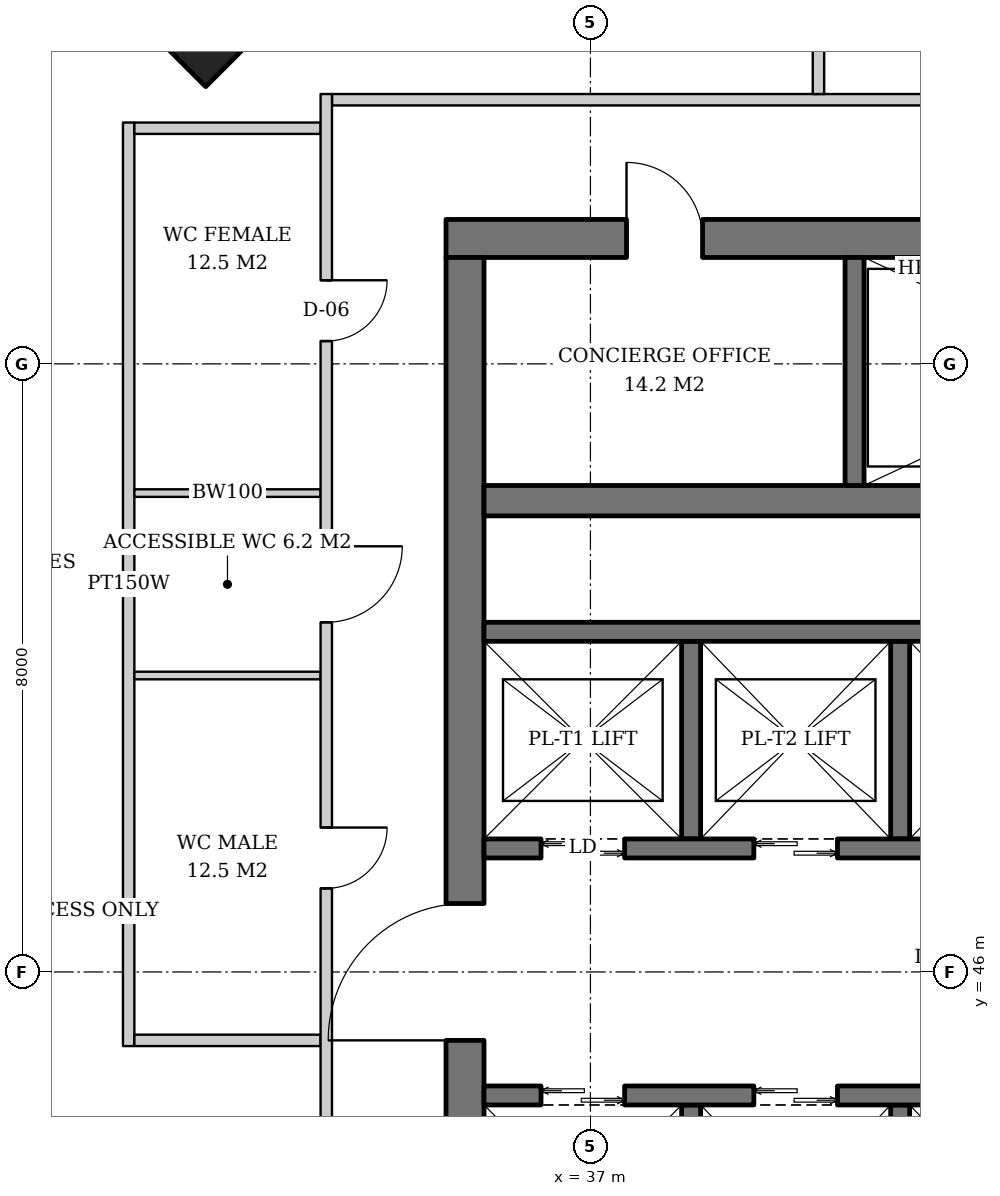
"""IFC4 building model, lengths in metres.
Left out: names, types, materials, properties, quantities, classifications, styles, units other than length and angle.
Written with IfcOpenShell. Run it as: python <this file> out.ifc"""

import sys

from ifc_helpers import new_model, si_unit, direction, frame, frame_2d, origin, origin_2d, place, context, subcontext, project, spatial, rectangle, extrude, element, fill, save


model = new_model("IFC4")
c1 = context("Model", 3, precision=1e-05, world=origin(), true_north=direction((0.0, 1.0)))
c2 = subcontext(c1, "Body", "Model", "MODEL_VIEW")
j1 = project(units=[si_unit("LENGTHUNIT", "METRE"), si_unit("PLANEANGLEUNIT", "RADIAN")], contexts=[c1])
p1 = place(None, origin())
s1 = spatial("IfcSite", under=j1, at=p1, CompositionType="ELEMENT")
p2 = place(p1, origin())
s2 = spatial("IfcBuilding", under=s1, at=p2, CompositionType="ELEMENT")
p3 = place(p2, frame((0.0, 0.0, 233.8)))
s3 = spatial("IfcBuildingStorey", under=s2, at=p3, CompositionType="ELEMENT", Elevation=233.8)
p4 = place(p3, frame((31.9, 59.1, 0.0), z_axis=(0.031962158256, -0.031962158256, 0.998977898093), x_axis=(0.707106781187, 0.707106781187, 0.0)))
e1 = element("IfcColumn", 1, at=p4, inside=s3, PredefinedType="COLUMN", context=c2, shape_type="SweptSolid", body=[
    extrude(rectangle(XDim=2.0, YDim=2.0, at=origin_2d()), origin(), (0.0, 0.0, 1.0), 3.804),
])
p5 = place(p3, frame((35.1, 55.65, 0.0), z_axis=(0.0, 0.0, 1.0), x_axis=(1.0, 0.0, 0.0)))
e2 = element("IfcWall", 2, at=p5, inside=s3, PredefinedType="SHEAR", context=c2, shape_type="SweptSolid", body=[
    extrude(rectangle(XDim=19.8, YDim=0.5, at=frame_2d((9.9, 0.0))), origin(), (0.0, 0.0, 1.0), 3.8),
])
p6 = place(p5, frame((14.54, 0.0, 0.0)))
e3 = element("IfcOpeningElement", 3, at=p6, cuts=e2, PredefinedType="OPENING", context=c2, shape_type="SweptSolid", body=[
    extrude(rectangle(XDim=1.0, YDim=2.1, at=frame_2d((0.5, 1.05))), frame((0.0, 0.26, 0.0), z_axis=(0.0, -1.0, 0.0), x_axis=(1.0, 0.0, 0.0)), (0.0, 0.0, 1.0), 0.52),
])
p7 = place(p5, frame((2.375, 0.0, 0.0)))
e4 = element("IfcOpeningElement", 4, at=p7, cuts=e2, PredefinedType="OPENING", context=c2, shape_type="SweptSolid", body=[
    extrude(rectangle(XDim=1.0, YDim=2.1, at=frame_2d((0.5, 1.05))), frame((0.0, 0.26, 0.0), z_axis=(0.0, -1.0, 0.0), x_axis=(1.0, 0.0, 0.0)), (0.0, 0.0, 1.0), 0.52),
])
p8 = place(p3, frame((35.35, 36.6, 0.0), z_axis=(0.0, 0.0, 1.0), x_axis=(0.0, 1.0, 0.0)))
e5 = element("IfcWall", 5, at=p8, inside=s3, PredefinedType="SHEAR", context=c2, shape_type="SweptSolid", body=[
    extrude(rectangle(XDim=18.8, YDim=0.5, at=frame_2d((9.4, 0.0))), origin(), (0.0, 0.0, 1.0), 3.8),
])
p9 = place(p8, frame((8.5, 0.0, 0.0)))
e6 = element("IfcOpeningElement", 6, at=p9, cuts=e5, PredefinedType="OPENING", context=c2, shape_type="SweptSolid", body=[
    extrude(rectangle(XDim=1.8, YDim=2.4, at=frame_2d((0.9, 1.2))), frame((0.0, 0.26, 0.0), z_axis=(0.0, -1.0, 0.0), x_axis=(1.0, 0.0, 0.0)), (0.0, 0.0, 1.0), 0.52),
])
p10 = place(p3, frame((35.6, 52.2, 0.0), z_axis=(0.0, 0.0, 1.0), x_axis=(1.0, 0.0, 0.0)))
e7 = element("IfcWall", 7, at=p10, inside=s3, PredefinedType="SHEAR", context=c2, shape_type="SweptSolid", body=[
    extrude(rectangle(XDim=18.8, YDim=0.4, at=frame_2d((9.4, 0.0))), origin(), (0.0, 0.0, 1.0), 3.8),
])
p11 = place(p3, frame((40.475, 52.4, 0.0), z_axis=(0.0, 0.0, 1.0), x_axis=(0.0, 1.0, 0.0)))
e8 = element("IfcWall", 8, at=p11, inside=s3, PredefinedType="SHEAR", context=c2, shape_type="SweptSolid", body=[
    extrude(rectangle(XDim=3.0, YDim=0.25, at=frame_2d((1.5, 0.0))), origin(), (0.0, 0.0, 1.0), 3.8),
])
for number, where, z_axis, x_axis in (
    (9, (38.325, 47.75, 0.0), (0.0, 0.0, 1.0), (0.0, 1.0, 0.0)),
    (10, (41.075, 47.75, 0.0), (0.0, 0.0, 1.0), (0.0, 1.0, 0.0)),
):
    element("IfcWall", number, at=place(p3, frame(where, z_axis=z_axis, x_axis=x_axis)), inside=s3, PredefinedType="SHEAR", context=c2, shape_type="SweptSolid", body=[
        extrude(rectangle(XDim=2.6, YDim=0.25, at=frame_2d((1.3, 0.0))), origin(), (0.0, 0.0, 1.0), 3.8),
    ])
p12 = place(p3, frame((35.6, 50.475, 0.0), z_axis=(0.0, 0.0, 1.0), x_axis=(1.0, 0.0, 0.0)))
e11 = element("IfcWall", 11, at=p12, inside=s3, PredefinedType="SHEAR", context=c2, shape_type="SweptSolid", body=[
    extrude(rectangle(XDim=11.1, YDim=0.25, at=frame_2d((5.55, 0.0))), origin(), (0.0, 0.0, 1.0), 3.8),
])
p13 = place(p3, frame((35.6, 47.625, 0.0), z_axis=(0.0, 0.0, 1.0), x_axis=(1.0, 0.0, 0.0)))
e12 = element("IfcWall", 12, at=p13, inside=s3, PredefinedType="SHEAR", context=c2, shape_type="SweptSolid", body=[
    extrude(rectangle(XDim=12.93, YDim=0.25, at=frame_2d((6.465, 0.0))), origin(), (0.0, 0.0, 1.0), 3.8),
])
p14 = place(p13, frame((0.75, 0.0, 0.0)))
e13 = element("IfcOpeningElement", 13, at=p14, cuts=e12, PredefinedType="OPENING", context=c2, shape_type="SweptSolid", body=[
    extrude(rectangle(XDim=1.1, YDim=2.2, at=frame_2d((0.55, 1.1))), frame((0.0, 0.135, 0.0), z_axis=(0.0, -1.0, 0.0), x_axis=(1.0, 0.0, 0.0)), (0.0, 0.0, 1.0), 0.27),
])
p15 = place(p13, frame((3.55, 0.0, 0.0)))
e14 = element("IfcOpeningElement", 14, at=p15, cuts=e12, PredefinedType="OPENING", context=c2, shape_type="SweptSolid", body=[
    extrude(rectangle(XDim=1.1, YDim=2.2, at=frame_2d((0.55, 1.1))), frame((0.0, 0.135, 0.0), z_axis=(0.0, -1.0, 0.0), x_axis=(1.0, 0.0, 0.0)), (0.0, 0.0, 1.0), 0.27),
])
p16 = place(p13, frame((6.3, 0.0, 0.0)))
e15 = element("IfcOpeningElement", 15, at=p16, cuts=e12, PredefinedType="OPENING", context=c2, shape_type="SweptSolid", body=[
    extrude(rectangle(XDim=1.1, YDim=2.2, at=frame_2d((0.55, 1.1))), frame((0.0, 0.135, 0.0), z_axis=(0.0, -1.0, 0.0), x_axis=(1.0, 0.0, 0.0)), (0.0, 0.0, 1.0), 0.27),
])
p17 = place(p13, frame((9.1, 0.0, 0.0)))
e16 = element("IfcOpeningElement", 16, at=p17, cuts=e12, PredefinedType="OPENING", context=c2, shape_type="SweptSolid", body=[
    extrude(rectangle(XDim=1.0, YDim=2.1, at=frame_2d((0.5, 1.05))), frame((0.0, 0.135, 0.0), z_axis=(0.0, -1.0, 0.0), x_axis=(1.0, 0.0, 0.0)), (0.0, 0.0, 1.0), 0.27),
])
p18 = place(p13, frame((11.615, 0.0, 0.0)))
e17 = element("IfcOpeningElement", 17, at=p18, cuts=e12, PredefinedType="OPENING", context=c2, shape_type="SweptSolid", body=[
    extrude(rectangle(XDim=0.8, YDim=2.0, at=frame_2d((0.4, 1.0))), frame((0.0, 0.135, 0.0), z_axis=(0.0, -1.0, 0.0), x_axis=(1.0, 0.0, 0.0)), (0.0, 0.0, 1.0), 0.27),
])
for number, where, z_axis, x_axis in (
    (18, (38.325, 44.25, 0.0), (0.0, 0.0, 1.0), (0.0, -1.0, 0.0)),
    (19, (41.075, 44.25, 0.0), (0.0, 0.0, 1.0), (0.0, -1.0, 0.0)),
):
    element("IfcWall", number, at=place(p3, frame(where, z_axis=z_axis, x_axis=x_axis)), inside=s3, PredefinedType="SHEAR", context=c2, shape_type="SweptSolid", body=[
        extrude(rectangle(XDim=2.6, YDim=0.25, at=frame_2d((1.3, 0.0))), origin(), (0.0, 0.0, 1.0), 3.8),
    ])
p19 = place(p3, frame((35.6, 44.375, 0.0), z_axis=(0.0, 0.0, 1.0), x_axis=(1.0, 0.0, 0.0)))
e20 = element("IfcWall", 20, at=p19, inside=s3, PredefinedType="SHEAR", context=c2, shape_type="SweptSolid", body=[
    extrude(rectangle(XDim=12.93, YDim=0.25, at=frame_2d((6.465, 0.0))), origin(), (0.0, 0.0, 1.0), 3.8),
])
p20 = place(p19, frame((0.75, 0.0, 0.0)))
e21 = element("IfcOpeningElement", 21, at=p20, cuts=e20, PredefinedType="OPENING", context=c2, shape_type="SweptSolid", body=[
    extrude(rectangle(XDim=1.1, YDim=2.2, at=frame_2d((0.55, 1.1))), frame((0.0, 0.135, 0.0), z_axis=(0.0, -1.0, 0.0), x_axis=(1.0, 0.0, 0.0)), (0.0, 0.0, 1.0), 0.27),
])
p21 = place(p19, frame((3.55, 0.0, 0.0)))
e22 = element("IfcOpeningElement", 22, at=p21, cuts=e20, PredefinedType="OPENING", context=c2, shape_type="SweptSolid", body=[
    extrude(rectangle(XDim=1.1, YDim=2.2, at=frame_2d((0.55, 1.1))), frame((0.0, 0.135, 0.0), z_axis=(0.0, -1.0, 0.0), x_axis=(1.0, 0.0, 0.0)), (0.0, 0.0, 1.0), 0.27),
])
p22 = place(p19, frame((6.3, 0.0, 0.0)))
e23 = element("IfcOpeningElement", 23, at=p22, cuts=e20, PredefinedType="OPENING", context=c2, shape_type="SweptSolid", body=[
    extrude(rectangle(XDim=1.1, YDim=2.2, at=frame_2d((0.55, 1.1))), frame((0.0, 0.135, 0.0), z_axis=(0.0, -1.0, 0.0), x_axis=(1.0, 0.0, 0.0)), (0.0, 0.0, 1.0), 0.27),
])
p23 = place(p19, frame((9.1, 0.0, 0.0)))
e24 = element("IfcOpeningElement", 24, at=p23, cuts=e20, PredefinedType="OPENING", context=c2, shape_type="SweptSolid", body=[
    extrude(rectangle(XDim=1.0, YDim=2.1, at=frame_2d((0.5, 1.05))), frame((0.0, 0.135, 0.0), z_axis=(0.0, -1.0, 0.0), x_axis=(1.0, 0.0, 0.0)), (0.0, 0.0, 1.0), 0.27),
])
p24 = place(p19, frame((11.615, 0.0, 0.0)))
e25 = element("IfcOpeningElement", 25, at=p24, cuts=e20, PredefinedType="OPENING", context=c2, shape_type="SweptSolid", body=[
    extrude(rectangle(XDim=0.8, YDim=2.0, at=frame_2d((0.4, 1.0))), frame((0.0, 0.135, 0.0), z_axis=(0.0, -1.0, 0.0), x_axis=(1.0, 0.0, 0.0)), (0.0, 0.0, 1.0), 0.27),
])
p25 = place(p3, frame((56.55, 57.475, 0.0), z_axis=(0.0, 0.0, 1.0), x_axis=(-1.0, 0.0, 0.0)))
e26 = element("IfcWall", 26, at=p25, inside=s3, PredefinedType="PARTITIONING", context=c2, shape_type="SweptSolid", body=[
    extrude(rectangle(XDim=22.95, YDim=0.15, at=frame_2d((11.475, 0.0))), origin(), (0.0, 0.0, 1.0), 3.02),
])
p26 = place(p25, frame((2.812, 0.0, 0.0)))
e27 = element("IfcOpeningElement", 27, at=p26, cuts=e26, PredefinedType="OPENING", context=c2, shape_type="SweptSolid", body=[
    extrude(rectangle(XDim=1.0, YDim=2.1, at=frame_2d((0.5, 1.05))), frame((0.0, 0.085, 0.0), z_axis=(0.0, -1.0, 0.0), x_axis=(1.0, 0.0, 0.0)), (0.0, 0.0, 1.0), 0.17),
])
p27 = place(p25, frame((11.05, 0.0, 0.0)))
e28 = element("IfcOpeningElement", 28, at=p27, cuts=e26, PredefinedType="OPENING", context=c2, shape_type="SweptSolid", body=[
    extrude(rectangle(XDim=1.0, YDim=2.1, at=frame_2d((0.5, 1.05))), frame((0.0, 0.085, 0.0), z_axis=(0.0, -1.0, 0.0), x_axis=(1.0, 0.0, 0.0)), (0.0, 0.0, 1.0), 0.17),
])
p28 = place(p3, frame((40.0, 57.55, 0.0), z_axis=(0.0, 0.0, 1.0), x_axis=(0.0, 1.0, 0.0)))
e29 = element("IfcWall", 29, at=p28, inside=s3, PredefinedType="PARTITIONING", context=c2, shape_type="SweptSolid", body=[
    extrude(rectangle(XDim=4.25, YDim=0.15, at=frame_2d((2.125, 0.0))), origin(), (0.0, 0.0, 1.0), 3.62),
])
p29 = place(p3, frame((30.925, 57.175, 0.0), z_axis=(0.0, 0.0, 1.0), x_axis=(0.0, -1.0, 0.0)))
e30 = element("IfcWall", 30, at=p29, inside=s3, PredefinedType="PARTITIONING", context=c2, shape_type="SweptSolid", body=[
    extrude(rectangle(XDim=12.15, YDim=0.15, at=frame_2d((6.075, 0.0))), origin(), (0.0, 0.0, 1.0), 3.02),
])
p30 = place(p3, frame((33.45, 57.1, 0.0), z_axis=(0.0, 0.0, 1.0), x_axis=(-1.0, 0.0, 0.0)))
e31 = element("IfcWall", 31, at=p30, inside=s3, PredefinedType="PARTITIONING", context=c2, shape_type="SweptSolid", body=[
    extrude(rectangle(XDim=2.45, YDim=0.15, at=frame_2d((1.225, 0.0))), origin(), (0.0, 0.0, 1.0), 3.62),
])
for number, where, z_axis, x_axis in (
    (32, (33.45, 52.3, 0.0), (0.0, 0.0, 1.0), (-1.0, 0.0, 0.0)),
    (33, (33.45, 49.9, 0.0), (0.0, 0.0, 1.0), (-1.0, 0.0, 0.0)),
):
    element("IfcWall", number, at=place(p3, frame(where, z_axis=z_axis, x_axis=x_axis)), inside=s3, PredefinedType="SOLIDWALL", context=c2, shape_type="SweptSolid", body=[
        extrude(rectangle(XDim=2.45, YDim=0.1, at=frame_2d((1.225, 0.0))), origin(), (0.0, 0.0, 1.0), 3.62),
    ])
p31 = place(p3, frame((33.45, 45.1, 0.0), z_axis=(0.0, 0.0, 1.0), x_axis=(-1.0, 0.0, 0.0)))
e34 = element("IfcWall", 34, at=p31, inside=s3, PredefinedType="PARTITIONING", context=c2, shape_type="SweptSolid", body=[
    extrude(rectangle(XDim=2.45, YDim=0.15, at=frame_2d((1.225, 0.0))), origin(), (0.0, 0.0, 1.0), 3.62),
])
p32 = place(p3, frame((33.525, 57.55, 0.0), z_axis=(0.0, 0.0, 1.0), x_axis=(0.0, -1.0, 0.0)))
e35 = element("IfcWall", 35, at=p32, inside=s3, PredefinedType="PARTITIONING", context=c2, shape_type="SweptSolid", body=[
    extrude(rectangle(XDim=22.95, YDim=0.15, at=frame_2d((11.475, 0.0))), origin(), (0.0, 0.0, 1.0), 3.02),
])
p33 = place(p32, frame((2.45, 0.0, 0.0)))
e36 = element("IfcOpeningElement", 36, at=p33, cuts=e35, PredefinedType="OPENING", context=c2, shape_type="SweptSolid", body=[
    extrude(rectangle(XDim=0.8, YDim=2.1, at=frame_2d((0.4, 1.05))), frame((0.0, 0.085, 0.0), z_axis=(0.0, -1.0, 0.0), x_axis=(1.0, 0.0, 0.0)), (0.0, 0.0, 1.0), 0.17),
])
p34 = place(p32, frame((5.95, 0.0, 0.0)))
e37 = element("IfcOpeningElement", 37, at=p34, cuts=e35, PredefinedType="OPENING", context=c2, shape_type="SweptSolid", body=[
    extrude(rectangle(XDim=1.0, YDim=2.1, at=frame_2d((0.5, 1.05))), frame((0.0, 0.085, 0.0), z_axis=(0.0, -1.0, 0.0), x_axis=(1.0, 0.0, 0.0)), (0.0, 0.0, 1.0), 0.17),
])
p35 = place(p32, frame((9.65, 0.0, 0.0)))
e38 = element("IfcOpeningElement", 38, at=p35, cuts=e35, PredefinedType="OPENING", context=c2, shape_type="SweptSolid", body=[
    extrude(rectangle(XDim=0.8, YDim=2.1, at=frame_2d((0.4, 1.05))), frame((0.0, 0.085, 0.0), z_axis=(0.0, -1.0, 0.0), x_axis=(1.0, 0.0, 0.0)), (0.0, 0.0, 1.0), 0.17),
])
p36 = place(p32, frame((13.6, 0.0, 0.0)))
e39 = element("IfcOpeningElement", 39, at=p36, cuts=e35, PredefinedType="OPENING", context=c2, shape_type="SweptSolid", body=[
    extrude(rectangle(XDim=1.8, YDim=2.4, at=frame_2d((0.9, 1.2))), frame((0.0, 0.085, 0.0), z_axis=(0.0, -1.0, 0.0), x_axis=(1.0, 0.0, 0.0)), (0.0, 0.0, 1.0), 0.17),
])
p37 = place(p14, origin())
e40 = element("IfcDoor", 40, at=p37, inside=s3, OperationType="DOUBLE_DOOR_SLIDING", PredefinedType="DOOR", context=c2, shape_type="SweptSolid", body=[
    extrude(rectangle(XDim=1.1, YDim=2.2, at=frame_2d((0.55, 1.1))), frame((0.0, 0.025, 0.0), z_axis=(0.0, -1.0, 0.0), x_axis=(1.0, 0.0, 0.0)), (0.0, 0.0, 1.0), 0.05),
])
fill(e13, e40)
p38 = place(p15, origin())
e41 = element("IfcDoor", 41, at=p38, inside=s3, OperationType="DOUBLE_DOOR_SLIDING", PredefinedType="DOOR", context=c2, shape_type="SweptSolid", body=[
    extrude(rectangle(XDim=1.1, YDim=2.2, at=frame_2d((0.55, 1.1))), frame((0.0, 0.025, 0.0), z_axis=(0.0, -1.0, 0.0), x_axis=(1.0, 0.0, 0.0)), (0.0, 0.0, 1.0), 0.05),
])
fill(e14, e41)
p39 = place(p20, origin())
e42 = element("IfcDoor", 42, at=p39, inside=s3, OperationType="DOUBLE_DOOR_SLIDING", PredefinedType="DOOR", context=c2, shape_type="SweptSolid", body=[
    extrude(rectangle(XDim=1.1, YDim=2.2, at=frame_2d((0.55, 1.1))), frame((0.0, 0.025, 0.0), z_axis=(0.0, -1.0, 0.0), x_axis=(1.0, 0.0, 0.0)), (0.0, 0.0, 1.0), 0.05),
])
fill(e21, e42)
p40 = place(p21, origin())
e43 = element("IfcDoor", 43, at=p40, inside=s3, OperationType="DOUBLE_DOOR_SLIDING", PredefinedType="DOOR", context=c2, shape_type="SweptSolid", body=[
    extrude(rectangle(XDim=1.1, YDim=2.2, at=frame_2d((0.55, 1.1))), frame((0.0, 0.025, 0.0), z_axis=(0.0, -1.0, 0.0), x_axis=(1.0, 0.0, 0.0)), (0.0, 0.0, 1.0), 0.05),
])
fill(e22, e43)
p41 = place(p9, origin())
e44 = element("IfcDoor", 44, at=p41, inside=s3, OperationType="DOUBLE_DOOR_SINGLE_SWING", PredefinedType="DOOR", context=c2, shape_type="SweptSolid", body=[
    extrude(rectangle(XDim=1.8, YDim=2.4, at=frame_2d((0.9, 1.2))), frame((0.0, 0.025, 0.0), z_axis=(0.0, -1.0, 0.0), x_axis=(1.0, 0.0, 0.0)), (0.0, 0.0, 1.0), 0.05),
])
fill(e6, e44)
p42 = place(p7, origin())
e45 = element("IfcDoor", 45, at=p42, inside=s3, OperationType="SINGLE_SWING_LEFT", PredefinedType="DOOR", context=c2, shape_type="SweptSolid", body=[
    extrude(rectangle(XDim=1.0, YDim=2.1, at=frame_2d((0.5, 1.05))), frame((0.0, -0.19, 0.0), z_axis=(0.0, -1.0, 0.0), x_axis=(1.0, 0.0, 0.0)), (0.0, 0.0, 1.0), 0.05),
])
fill(e4, e45)
p43 = place(p33, origin())
e46 = element("IfcDoor", 46, at=p43, inside=s3, OperationType="SINGLE_SWING_LEFT", PredefinedType="DOOR", context=c2, shape_type="SweptSolid", body=[
    extrude(rectangle(XDim=0.8, YDim=2.1, at=frame_2d((0.4, 1.05))), frame((0.0, 0.025, 0.0), z_axis=(0.0, -1.0, 0.0), x_axis=(1.0, 0.0, 0.0)), (0.0, 0.0, 1.0), 0.05),
])
fill(e36, e46)
p44 = place(p34, origin())
e47 = element("IfcDoor", 47, at=p44, inside=s3, OperationType="SINGLE_SWING_LEFT", PredefinedType="DOOR", context=c2, shape_type="SweptSolid", body=[
    extrude(rectangle(XDim=1.0, YDim=2.1, at=frame_2d((0.5, 1.05))), frame((0.0, 0.025, 0.0), z_axis=(0.0, -1.0, 0.0), x_axis=(1.0, 0.0, 0.0)), (0.0, 0.0, 1.0), 0.05),
])
fill(e37, e47)
p45 = place(p35, origin())
e48 = element("IfcDoor", 48, at=p45, inside=s3, OperationType="SINGLE_SWING_LEFT", PredefinedType="DOOR", context=c2, shape_type="SweptSolid", body=[
    extrude(rectangle(XDim=0.8, YDim=2.1, at=frame_2d((0.4, 1.05))), frame((0.0, 0.025, 0.0), z_axis=(0.0, -1.0, 0.0), x_axis=(1.0, 0.0, 0.0)), (0.0, 0.0, 1.0), 0.05),
])
fill(e38, e48)
save(model, sys.argv[1])
